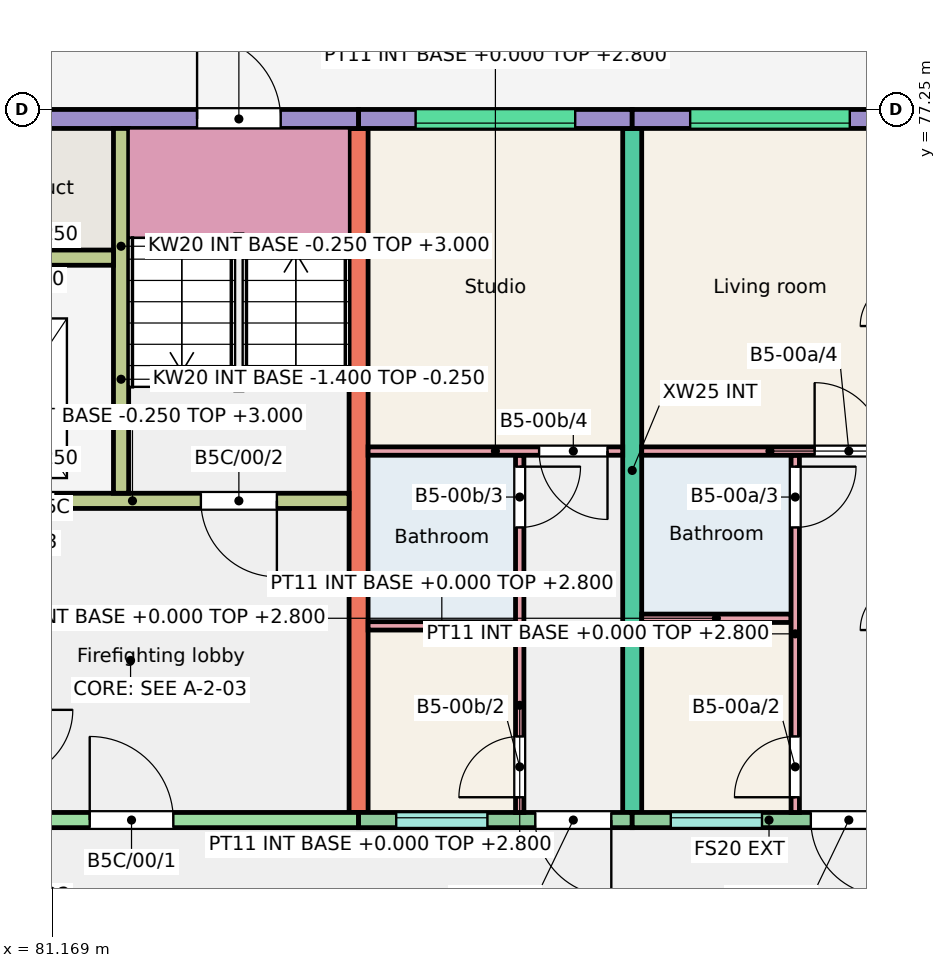
"""IFC4 building model, lengths in metres.
Left out: names, types, materials, properties, quantities, classifications, styles, units other than length and angle.
Written with IfcOpenShell. Run it as: python <this file> out.ifc"""

import sys

from ifc_helpers import new_model, si_unit, direction, frame, frame_2d, origin, place, context, subcontext, project, spatial, rectangle, extrude, element, fill, save


model = new_model("IFC4")
c1 = context("Model", 3, precision=1e-05, world=origin(), true_north=direction((0.0, 1.0)))
c2 = subcontext(c1, "Body", "Model", "MODEL_VIEW")
j1 = project(units=[si_unit("LENGTHUNIT", "METRE"), si_unit("PLANEANGLEUNIT", "RADIAN")], contexts=[c1])
p1 = place(None, origin())
s1 = spatial("IfcSite", under=j1, at=p1, CompositionType="ELEMENT")
p2 = place(p1, origin())
s2 = spatial("IfcBuilding", under=s1, at=p2, CompositionType="ELEMENT")
p3 = place(p2, origin())
s3 = spatial("IfcBuildingStorey", under=s2, at=p3, CompositionType="ELEMENT", Elevation=0.0)
for number, where, z_axis, x_axis in (
    (1, (85.2, 68.0, -0.25), (0.0, 0.0, 1.0), (0.0, 1.0, 0.0)),
    (2, (88.8, 68.0, -0.25), (0.0, 0.0, 1.0), (0.0, 1.0, 0.0)),
):
    element("IfcWall", number, at=place(p3, frame(where, z_axis=z_axis, x_axis=x_axis)), inside=s3, PredefinedType="SHEAR", context=c2, shape_type="SweptSolid", body=[
        extrude(rectangle(XDim=9.0, YDim=0.25, at=frame_2d((4.5, 0.0))), origin(), (0.0, 0.0, 1.0), 3.25),
    ])
p4 = place(p3, frame((79.2, 77.125, -0.25), z_axis=(0.0, 0.0, 1.0), x_axis=(1.0, 0.0, 0.0)))
e3 = element("IfcWall", 3, at=p4, inside=s3, PredefinedType="SOLIDWALL", context=c2, shape_type="SweptSolid", body=[
    extrude(rectangle(XDim=6.0, YDim=0.25, at=frame_2d((3.0, 0.0))), origin(), (0.0, 0.0, 1.0), 3.25),
])
p5 = place(p4, frame((3.875, 0.0, 0.25)))
e4 = element("IfcOpeningElement", 4, at=p5, cuts=e3, PredefinedType="OPENING", context=c2, shape_type="SweptSolid", body=[
    extrude(rectangle(XDim=1.1, YDim=2.1, at=frame_2d((0.55, 1.05))), frame((0.0, 0.135, 0.0), z_axis=(0.0, -1.0, 0.0), x_axis=(1.0, 0.0, 0.0)), (0.0, 0.0, 1.0), 0.27),
])
p6 = place(p3, frame((79.35, 67.9, -0.25), z_axis=(0.0, 0.0, 1.0), x_axis=(1.0, 0.0, 0.0)))
e5 = element("IfcWall", 5, at=p6, inside=s3, PredefinedType="SHEAR", context=c2, shape_type="SweptSolid", body=[
    extrude(rectangle(XDim=5.85, YDim=0.2, at=frame_2d((2.925, 0.0))), origin(), (0.0, 0.0, 1.0), 3.25),
])
p7 = place(p6, frame((2.312, 0.0, 0.25)))
e6 = element("IfcOpeningElement", 6, at=p7, cuts=e5, PredefinedType="OPENING", context=c2, shape_type="SweptSolid", body=[
    extrude(rectangle(XDim=1.1, YDim=2.1, at=frame_2d((0.55, 1.05))), frame((0.0, 0.11, 0.0), z_axis=(0.0, -1.0, 0.0), x_axis=(1.0, 0.0, 0.0)), (0.0, 0.0, 1.0), 0.22),
])
p8 = place(p3, frame((79.35, 72.1, -0.25), z_axis=(0.0, 0.0, 1.0), x_axis=(1.0, 0.0, 0.0)))
e7 = element("IfcWall", 7, at=p8, inside=s3, PredefinedType="SHEAR", context=c2, shape_type="SweptSolid", body=[
    extrude(rectangle(XDim=5.725, YDim=0.2, at=frame_2d((2.862, 0.0))), origin(), (0.0, 0.0, 1.0), 3.25),
])
p9 = place(p8, frame((3.775, 0.0, 0.25)))
e8 = element("IfcOpeningElement", 8, at=p9, cuts=e7, PredefinedType="OPENING", context=c2, shape_type="SweptSolid", body=[
    extrude(rectangle(XDim=1.0, YDim=2.1, at=frame_2d((0.5, 1.05))), frame((0.0, 0.11, 0.0), z_axis=(0.0, -1.0, 0.0), x_axis=(1.0, 0.0, 0.0)), (0.0, 0.0, 1.0), 0.22),
])
p10 = place(p8, frame((0.762, 0.0, 0.25)))
e9 = element("IfcOpeningElement", 9, at=p10, cuts=e7, PredefinedType="OPENING", context=c2, shape_type="SweptSolid", body=[
    extrude(rectangle(XDim=1.1, YDim=2.1, at=frame_2d((0.55, 1.05))), frame((0.0, 0.11, 0.0), z_axis=(0.0, -1.0, 0.0), x_axis=(1.0, 0.0, 0.0)), (0.0, 0.0, 1.0), 0.22),
])
p11 = place(p3, frame((82.075, 72.2, -0.25), z_axis=(0.0, 0.0, 1.0), x_axis=(0.0, 1.0, 0.0)))
e10 = element("IfcWall", 10, at=p11, inside=s3, PredefinedType="SHEAR", context=c2, shape_type="SweptSolid", body=[
    extrude(rectangle(XDim=4.8, YDim=0.2, at=frame_2d((2.4, 0.0))), origin(), (0.0, 0.0, 1.0), 3.25),
])
p12 = place(p3, frame((79.35, 75.3, -0.25), z_axis=(0.0, 0.0, 1.0), x_axis=(1.0, 0.0, 0.0)))
e11 = element("IfcWall", 11, at=p12, inside=s3, PredefinedType="SHEAR", context=c2, shape_type="SweptSolid", body=[
    extrude(rectangle(XDim=2.625, YDim=0.2, at=frame_2d((1.312, 0.0))), origin(), (0.0, 0.0, 1.0), 3.25),
])
p13 = place(p3, frame((85.2, 77.125, -0.25), z_axis=(0.0, 0.0, 1.0), x_axis=(1.0, 0.0, 0.0)))
e12 = element("IfcWall", 12, at=p13, inside=s3, PredefinedType="SOLIDWALL", context=c2, shape_type="SweptSolid", body=[
    extrude(rectangle(XDim=3.6, YDim=0.25, at=frame_2d((1.8, 0.0))), origin(), (0.0, 0.0, 1.0), 3.25),
])
p14 = place(p13, frame((0.75, 0.0, 1.45)))
e13 = element("IfcOpeningElement", 13, at=p14, cuts=e12, PredefinedType="OPENING", context=c2, shape_type="SweptSolid", body=[
    extrude(rectangle(XDim=2.1, YDim=1.2, at=frame_2d((1.05, 0.6))), frame((0.0, 0.135, 0.0), z_axis=(0.0, -1.0, 0.0), x_axis=(1.0, 0.0, 0.0)), (0.0, 0.0, 1.0), 0.27),
])
p15 = place(p3, frame((85.2, 67.9, -0.25), z_axis=(0.0, 0.0, 1.0), x_axis=(1.0, 0.0, 0.0)))
e14 = element("IfcWall", 14, at=p15, inside=s3, PredefinedType="SOLIDWALL", context=c2, shape_type="SweptSolid", body=[
    extrude(rectangle(XDim=3.6, YDim=0.2, at=frame_2d((1.8, 0.0))), origin(), (0.0, 0.0, 1.0), 3.25),
])
p16 = place(p15, frame((0.495, 0.0, 1.35)))
e15 = element("IfcOpeningElement", 15, at=p16, cuts=e14, PredefinedType="OPENING", context=c2, shape_type="SweptSolid", body=[
    extrude(rectangle(XDim=1.2, YDim=1.3, at=frame_2d((0.6, 0.65))), frame((0.0, 0.11, 0.0), z_axis=(0.0, -1.0, 0.0), x_axis=(1.0, 0.0, 0.0)), (0.0, 0.0, 1.0), 0.22),
])
p17 = place(p15, frame((2.325, 0.0, 0.25)))
e16 = element("IfcOpeningElement", 16, at=p17, cuts=e14, PredefinedType="OPENING", context=c2, shape_type="SweptSolid", body=[
    extrude(rectangle(XDim=1.0, YDim=2.1, at=frame_2d((0.5, 1.05))), frame((0.0, 0.11, 0.0), z_axis=(0.0, -1.0, 0.0), x_axis=(1.0, 0.0, 0.0)), (0.0, 0.0, 1.0), 0.22),
])
p18 = place(p3, frame((88.8, 77.125, -0.25), z_axis=(0.0, 0.0, 1.0), x_axis=(1.0, 0.0, 0.0)))
e17 = element("IfcWall", 17, at=p18, inside=s3, PredefinedType="SOLIDWALL", context=c2, shape_type="SweptSolid", body=[
    extrude(rectangle(XDim=3.6, YDim=0.25, at=frame_2d((1.8, 0.0))), origin(), (0.0, 0.0, 1.0), 3.25),
])
p19 = place(p18, frame((0.762, 0.0, 1.45)))
e18 = element("IfcOpeningElement", 18, at=p19, cuts=e17, PredefinedType="OPENING", context=c2, shape_type="SweptSolid", body=[
    extrude(rectangle(XDim=2.1, YDim=1.2, at=frame_2d((1.05, 0.6))), frame((0.0, 0.135, 0.0), z_axis=(0.0, -1.0, 0.0), x_axis=(1.0, 0.0, 0.0)), (0.0, 0.0, 1.0), 0.27),
])
p20 = place(p3, frame((88.8, 67.9, -0.25), z_axis=(0.0, 0.0, 1.0), x_axis=(1.0, 0.0, 0.0)))
e19 = element("IfcWall", 19, at=p20, inside=s3, PredefinedType="SOLIDWALL", context=c2, shape_type="SweptSolid", body=[
    extrude(rectangle(XDim=3.6, YDim=0.2, at=frame_2d((1.8, 0.0))), origin(), (0.0, 0.0, 1.0), 3.25),
])
p21 = place(p20, frame((0.508, 0.0, 1.35)))
e20 = element("IfcOpeningElement", 20, at=p21, cuts=e19, PredefinedType="OPENING", context=c2, shape_type="SweptSolid", body=[
    extrude(rectangle(XDim=1.2, YDim=1.3, at=frame_2d((0.6, 0.65))), frame((0.0, 0.11, 0.0), z_axis=(0.0, -1.0, 0.0), x_axis=(1.0, 0.0, 0.0)), (0.0, 0.0, 1.0), 0.22),
])
p22 = place(p20, frame((2.35, 0.0, 0.25)))
e21 = element("IfcOpeningElement", 21, at=p22, cuts=e19, PredefinedType="OPENING", context=c2, shape_type="SweptSolid", body=[
    extrude(rectangle(XDim=1.0, YDim=2.1, at=frame_2d((0.5, 1.05))), frame((0.0, 0.11, 0.0), z_axis=(0.0, -1.0, 0.0), x_axis=(1.0, 0.0, 0.0)), (0.0, 0.0, 1.0), 0.22),
])
for number, where, z_axis, x_axis in (
    (22, (79.2, 72.1, -1.4), (0.0, 0.0, 1.0), (1.0, 0.0, 0.0)),
    (23, (79.2, 75.3, -1.4), (0.0, 0.0, 1.0), (1.0, 0.0, 0.0)),
):
    element("IfcWall", number, at=place(p3, frame(where, z_axis=z_axis, x_axis=x_axis)), inside=s3, PredefinedType="SHEAR", context=c2, shape_type="SweptSolid", body=[
        extrude(rectangle(XDim=2.975, YDim=0.2, at=frame_2d((1.488, 0.0))), origin(), (0.0, 0.0, 1.0), 1.15),
    ])
p23 = place(p3, frame((82.075, 72.2, -1.4), z_axis=(0.0, 0.0, 1.0), x_axis=(0.0, 1.0, 0.0)))
e24 = element("IfcWall", 24, at=p23, inside=s3, PredefinedType="SHEAR", context=c2, shape_type="SweptSolid", body=[
    extrude(rectangle(XDim=3.0, YDim=0.2, at=frame_2d((1.5, 0.0))), origin(), (0.0, 0.0, 1.0), 1.15),
])
p24 = place(p3, frame((88.925, 70.555, 0.0), z_axis=(0.0, 0.0, 1.0), x_axis=(1.0, 0.0, 0.0)))
e25 = element("IfcWall", 25, at=p24, inside=s3, PredefinedType="PARTITIONING", context=c2, shape_type="SweptSolid", body=[
    extrude(rectangle(XDim=1.965, YDim=0.11, at=frame_2d((0.982, 0.0))), origin(), (0.0, 0.0, 1.0), 2.8),
])
p25 = place(p3, frame((90.945, 68.0, 0.0), z_axis=(0.0, 0.0, 1.0), x_axis=(0.0, 1.0, 0.0)))
e26 = element("IfcWall", 26, at=p25, inside=s3, PredefinedType="PARTITIONING", context=c2, shape_type="SweptSolid", body=[
    extrude(rectangle(XDim=4.7, YDim=0.11, at=frame_2d((2.35, 0.0))), origin(), (0.0, 0.0, 1.0), 2.8),
])
p26 = place(p25, frame((0.2, 0.0, 0.0)))
e27 = element("IfcOpeningElement", 27, at=p26, cuts=e26, PredefinedType="OPENING", context=c2, shape_type="SweptSolid", body=[
    extrude(rectangle(XDim=0.8, YDim=2.1, at=frame_2d((0.4, 1.05))), frame((0.0, 0.065, 0.0), z_axis=(0.0, -1.0, 0.0), x_axis=(1.0, 0.0, 0.0)), (0.0, 0.0, 1.0), 0.13),
])
p27 = place(p25, frame((3.75, 0.0, 0.0)))
e28 = element("IfcOpeningElement", 28, at=p27, cuts=e26, PredefinedType="OPENING", context=c2, shape_type="SweptSolid", body=[
    extrude(rectangle(XDim=0.8, YDim=2.1, at=frame_2d((0.4, 1.05))), frame((0.0, 0.065, 0.0), z_axis=(0.0, -1.0, 0.0), x_axis=(1.0, 0.0, 0.0)), (0.0, 0.0, 1.0), 0.13),
])
p28 = place(p3, frame((88.925, 72.755, 0.0), z_axis=(0.0, 0.0, 1.0), x_axis=(1.0, 0.0, 0.0)))
e29 = element("IfcWall", 29, at=p28, inside=s3, PredefinedType="PARTITIONING", context=c2, shape_type="SweptSolid", body=[
    extrude(rectangle(XDim=3.375, YDim=0.11, at=frame_2d((1.688, 0.0))), origin(), (0.0, 0.0, 1.0), 2.8),
])
p29 = place(p28, frame((2.275, 0.0, 0.0)))
e30 = element("IfcOpeningElement", 30, at=p29, cuts=e29, PredefinedType="OPENING", context=c2, shape_type="SweptSolid", body=[
    extrude(rectangle(XDim=0.9, YDim=2.1, at=frame_2d((0.45, 1.05))), frame((0.0, 0.065, 0.0), z_axis=(0.0, -1.0, 0.0), x_axis=(1.0, 0.0, 0.0)), (0.0, 0.0, 1.0), 0.13),
])
p30 = place(p3, frame((85.325, 70.455, 0.0), z_axis=(0.0, 0.0, 1.0), x_axis=(1.0, 0.0, 0.0)))
e31 = element("IfcWall", 31, at=p30, inside=s3, PredefinedType="PARTITIONING", context=c2, shape_type="SweptSolid", body=[
    extrude(rectangle(XDim=1.94, YDim=0.11, at=frame_2d((0.97, 0.0))), origin(), (0.0, 0.0, 1.0), 2.8),
])
p31 = place(p3, frame((87.32, 68.0, 0.0), z_axis=(0.0, 0.0, 1.0), x_axis=(0.0, 1.0, 0.0)))
e32 = element("IfcWall", 32, at=p31, inside=s3, PredefinedType="PARTITIONING", context=c2, shape_type="SweptSolid", body=[
    extrude(rectangle(XDim=4.7, YDim=0.11, at=frame_2d((2.35, 0.0))), origin(), (0.0, 0.0, 1.0), 2.8),
])
p32 = place(p31, frame((0.2, 0.0, 0.0)))
e33 = element("IfcOpeningElement", 33, at=p32, cuts=e32, PredefinedType="OPENING", context=c2, shape_type="SweptSolid", body=[
    extrude(rectangle(XDim=0.8, YDim=2.1, at=frame_2d((0.4, 1.05))), frame((0.0, 0.065, 0.0), z_axis=(0.0, -1.0, 0.0), x_axis=(1.0, 0.0, 0.0)), (0.0, 0.0, 1.0), 0.13),
])
p33 = place(p31, frame((3.75, 0.0, 0.0)))
e34 = element("IfcOpeningElement", 34, at=p33, cuts=e32, PredefinedType="OPENING", context=c2, shape_type="SweptSolid", body=[
    extrude(rectangle(XDim=0.8, YDim=2.1, at=frame_2d((0.4, 1.05))), frame((0.0, 0.065, 0.0), z_axis=(0.0, -1.0, 0.0), x_axis=(1.0, 0.0, 0.0)), (0.0, 0.0, 1.0), 0.13),
])
p34 = place(p3, frame((85.325, 72.755, 0.0), z_axis=(0.0, 0.0, 1.0), x_axis=(1.0, 0.0, 0.0)))
e35 = element("IfcWall", 35, at=p34, inside=s3, PredefinedType="PARTITIONING", context=c2, shape_type="SweptSolid", body=[
    extrude(rectangle(XDim=3.35, YDim=0.11, at=frame_2d((1.675, 0.0))), origin(), (0.0, 0.0, 1.0), 2.8),
])
p35 = place(p34, frame((2.25, 0.0, 0.0)))
e36 = element("IfcOpeningElement", 36, at=p35, cuts=e35, PredefinedType="OPENING", context=c2, shape_type="SweptSolid", body=[
    extrude(rectangle(XDim=0.9, YDim=2.1, at=frame_2d((0.45, 1.05))), frame((0.0, 0.065, 0.0), z_axis=(0.0, -1.0, 0.0), x_axis=(1.0, 0.0, 0.0)), (0.0, 0.0, 1.0), 0.13),
])
p36 = place(p21, origin())
e37 = element("IfcWindow", 37, at=p36, inside=s3, PartitioningType="SINGLE_PANEL", PredefinedType="WINDOW", context=c2, shape_type="SweptSolid", body=[
    extrude(rectangle(XDim=1.2, YDim=1.3, at=frame_2d((0.6, 0.65))), frame((0.0, 0.06, 0.0), z_axis=(0.0, -1.0, 0.0), x_axis=(1.0, 0.0, 0.0)), (0.0, 0.0, 1.0), 0.06),
])
fill(e20, e37)
p37 = place(p19, origin())
e38 = element("IfcWindow", 38, at=p37, inside=s3, PartitioningType="SINGLE_PANEL", PredefinedType="WINDOW", context=c2, shape_type="SweptSolid", body=[
    extrude(rectangle(XDim=2.1, YDim=1.2, at=frame_2d((1.05, 0.6))), frame((0.0, -0.025, 0.0), z_axis=(0.0, -1.0, 0.0), x_axis=(1.0, 0.0, 0.0)), (0.0, 0.0, 1.0), 0.06),
])
fill(e18, e38)
p38 = place(p16, origin())
e39 = element("IfcWindow", 39, at=p38, inside=s3, PartitioningType="SINGLE_PANEL", PredefinedType="WINDOW", context=c2, shape_type="SweptSolid", body=[
    extrude(rectangle(XDim=1.2, YDim=1.3, at=frame_2d((0.6, 0.65))), frame((0.0, 0.06, 0.0), z_axis=(0.0, -1.0, 0.0), x_axis=(1.0, 0.0, 0.0)), (0.0, 0.0, 1.0), 0.06),
])
fill(e15, e39)
p39 = place(p14, origin())
e40 = element("IfcWindow", 40, at=p39, inside=s3, PartitioningType="SINGLE_PANEL", PredefinedType="WINDOW", context=c2, shape_type="SweptSolid", body=[
    extrude(rectangle(XDim=2.1, YDim=1.2, at=frame_2d((1.05, 0.6))), frame((0.0, -0.025, 0.0), z_axis=(0.0, -1.0, 0.0), x_axis=(1.0, 0.0, 0.0)), (0.0, 0.0, 1.0), 0.06),
])
fill(e13, e40)
p40 = place(p22, origin())
e41 = element("IfcDoor", 41, at=p40, inside=s3, OperationType="SINGLE_SWING_RIGHT", PredefinedType="DOOR", context=c2, shape_type="SweptSolid", body=[
    extrude(rectangle(XDim=1.0, YDim=2.1, at=frame_2d((0.5, 1.05))), frame((0.0, 0.025, 0.0), z_axis=(0.0, -1.0, 0.0), x_axis=(1.0, 0.0, 0.0)), (0.0, 0.0, 1.0), 0.05),
])
fill(e21, e41)
p41 = place(p26, origin())
e42 = element("IfcDoor", 42, at=p41, inside=s3, OperationType="SINGLE_SWING_LEFT", PredefinedType="DOOR", context=c2, shape_type="SweptSolid", body=[
    extrude(rectangle(XDim=0.8, YDim=2.1, at=frame_2d((0.4, 1.05))), frame((0.0, 0.025, 0.0), z_axis=(0.0, -1.0, 0.0), x_axis=(1.0, 0.0, 0.0)), (0.0, 0.0, 1.0), 0.05),
])
fill(e27, e42)
p42 = place(p27, origin())
e43 = element("IfcDoor", 43, at=p42, inside=s3, OperationType="SINGLE_SWING_RIGHT", PredefinedType="DOOR", context=c2, shape_type="SweptSolid", body=[
    extrude(rectangle(XDim=0.8, YDim=2.1, at=frame_2d((0.4, 1.05))), frame((0.0, 0.025, 0.0), z_axis=(0.0, -1.0, 0.0), x_axis=(1.0, 0.0, 0.0)), (0.0, 0.0, 1.0), 0.05),
])
fill(e28, e43)
p43 = place(p29, origin())
e44 = element("IfcDoor", 44, at=p43, inside=s3, OperationType="SINGLE_SWING_LEFT", PredefinedType="DOOR", context=c2, shape_type="SweptSolid", body=[
    extrude(rectangle(XDim=0.9, YDim=2.1, at=frame_2d((0.45, 1.05))), frame((0.0, 0.025, 0.0), z_axis=(0.0, -1.0, 0.0), x_axis=(1.0, 0.0, 0.0)), (0.0, 0.0, 1.0), 0.05),
])
fill(e30, e44)
p44 = place(p17, origin())
e45 = element("IfcDoor", 45, at=p44, inside=s3, OperationType="SINGLE_SWING_RIGHT", PredefinedType="DOOR", context=c2, shape_type="SweptSolid", body=[
    extrude(rectangle(XDim=1.0, YDim=2.1, at=frame_2d((0.5, 1.05))), frame((0.0, 0.025, 0.0), z_axis=(0.0, -1.0, 0.0), x_axis=(1.0, 0.0, 0.0)), (0.0, 0.0, 1.0), 0.05),
])
fill(e16, e45)
p45 = place(p32, origin())
e46 = element("IfcDoor", 46, at=p45, inside=s3, OperationType="SINGLE_SWING_LEFT", PredefinedType="DOOR", context=c2, shape_type="SweptSolid", body=[
    extrude(rectangle(XDim=0.8, YDim=2.1, at=frame_2d((0.4, 1.05))), frame((0.0, 0.025, 0.0), z_axis=(0.0, -1.0, 0.0), x_axis=(1.0, 0.0, 0.0)), (0.0, 0.0, 1.0), 0.05),
])
fill(e33, e46)
p46 = place(p33, origin())
e47 = element("IfcDoor", 47, at=p46, inside=s3, OperationType="SINGLE_SWING_RIGHT", PredefinedType="DOOR", context=c2, shape_type="SweptSolid", body=[
    extrude(rectangle(XDim=0.8, YDim=2.1, at=frame_2d((0.4, 1.05))), frame((0.0, 0.025, 0.0), z_axis=(0.0, -1.0, 0.0), x_axis=(1.0, 0.0, 0.0)), (0.0, 0.0, 1.0), 0.05),
])
fill(e34, e47)
p47 = place(p35, origin())
e48 = element("IfcDoor", 48, at=p47, inside=s3, OperationType="SINGLE_SWING_RIGHT", PredefinedType="DOOR", context=c2, shape_type="SweptSolid", body=[
    extrude(rectangle(XDim=0.9, YDim=2.1, at=frame_2d((0.45, 1.05))), frame((0.0, 0.025, 0.0), z_axis=(0.0, -1.0, 0.0), x_axis=(1.0, 0.0, 0.0)), (0.0, 0.0, 1.0), 0.05),
])
fill(e36, e48)
p48 = place(p7, origin())
e49 = element("IfcDoor", 49, at=p48, inside=s3, OperationType="SINGLE_SWING_LEFT", PredefinedType="DOOR", context=c2, shape_type="SweptSolid", body=[
    extrude(rectangle(XDim=1.1, YDim=2.1, at=frame_2d((0.55, 1.05))), frame((0.0, 0.025, 0.0), z_axis=(0.0, -1.0, 0.0), x_axis=(1.0, 0.0, 0.0)), (0.0, 0.0, 1.0), 0.05),
])
fill(e6, e49)
p49 = place(p9, origin())
e50 = element("IfcDoor", 50, at=p49, inside=s3, OperationType="SINGLE_SWING_RIGHT", PredefinedType="DOOR", context=c2, shape_type="SweptSolid", body=[
    extrude(rectangle(XDim=1.0, YDim=2.1, at=frame_2d((0.5, 1.05))), frame((0.0, 0.025, 0.0), z_axis=(0.0, -1.0, 0.0), x_axis=(1.0, 0.0, 0.0)), (0.0, 0.0, 1.0), 0.05),
])
fill(e8, e50)
p50 = place(p10, origin())
e51 = element("IfcDoor", 51, at=p50, inside=s3, OperationType="DOUBLE_DOOR_SLIDING", PredefinedType="DOOR", context=c2, shape_type="SweptSolid", body=[
    extrude(rectangle(XDim=1.1, YDim=2.1, at=frame_2d((0.55, 1.05))), frame((0.0, 0.025, 0.0), z_axis=(0.0, -1.0, 0.0), x_axis=(1.0, 0.0, 0.0)), (0.0, 0.0, 1.0), 0.05),
])
fill(e9, e51)
p51 = place(p5, origin())
e52 = element("IfcDoor", 52, at=p51, inside=s3, OperationType="SINGLE_SWING_LEFT", PredefinedType="DOOR", context=c2, shape_type="SweptSolid", body=[
    extrude(rectangle(XDim=1.1, YDim=2.1, at=frame_2d((0.55, 1.05))), frame((0.0, 0.025, 0.0), z_axis=(0.0, -1.0, 0.0), x_axis=(1.0, 0.0, 0.0)), (0.0, 0.0, 1.0), 0.05),
])
fill(e4, e52)
save(model, sys.argv[1])
